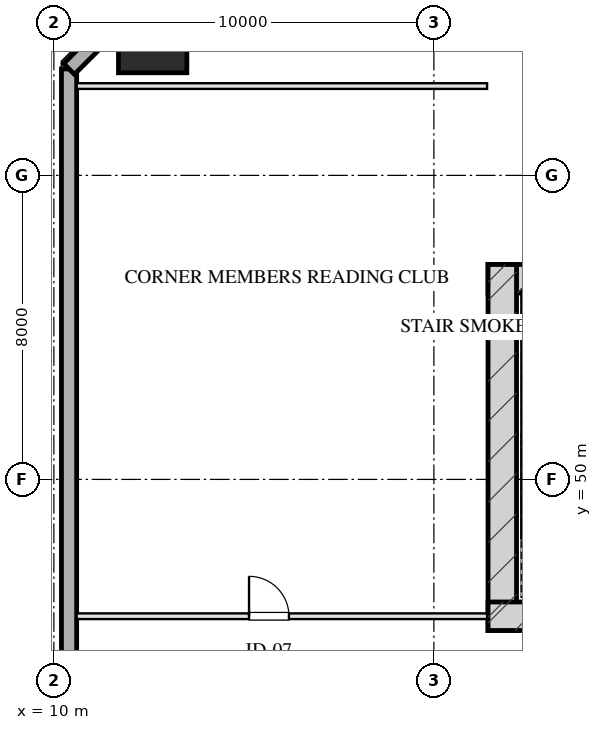
"""IFC4 building model, lengths in metres.
Left out: names, types, materials, properties, quantities, classifications, styles, units other than length and angle.
Written with IfcOpenShell. Run it as: python <this file> out.ifc"""

import sys

from ifc_helpers import new_model, si_unit, direction, frame, frame_2d, origin, origin_2d, place, context, subcontext, project, spatial, rectangle, hollow_rectangle, extrude, element, fill, save


model = new_model("IFC4")
c1 = context("Model", 3, precision=1e-05, world=origin(), true_north=direction((0.0, 1.0)))
c2 = subcontext(c1, "Body", "Model", "MODEL_VIEW")
j1 = project(units=[si_unit("LENGTHUNIT", "METRE"), si_unit("PLANEANGLEUNIT", "RADIAN")], contexts=[c1])
p1 = place(None, origin())
s1 = spatial("IfcSite", under=j1, at=p1, CompositionType="ELEMENT")
p2 = place(p1, origin())
s2 = spatial("IfcBuilding", under=s1, at=p2, CompositionType="ELEMENT")
p3 = place(p2, frame((0.0, 0.0, 54.05)))
s3 = spatial("IfcBuildingStorey", under=s2, at=p3, CompositionType="ELEMENT", Elevation=54.05)
p4 = place(p3, frame((21.425, 55.28, 0.0), z_axis=(0.0, 0.0, 1.0), x_axis=(1.0, 0.0, 0.0)))
e1 = element("IfcWall", 1, at=p4, inside=s3, PredefinedType="SHEAR", context=c2, shape_type="SweptSolid", body=[
    extrude(rectangle(XDim=17.15, YDim=0.75, at=frame_2d((8.575, 0.0))), origin(), (0.0, 0.0, 1.0), 3.45),
])
p5 = place(p3, frame((21.8, 46.025, 0.0), z_axis=(0.0, 0.0, 1.0), x_axis=(0.0, 1.0, 0.0)))
e2 = element("IfcWall", 2, at=p5, inside=s3, PredefinedType="SHEAR", context=c2, shape_type="SweptSolid", body=[
    extrude(rectangle(XDim=9.63, YDim=0.75, at=frame_2d((4.815, 0.0))), origin(), (0.0, 0.0, 1.0), 3.45),
])
p6 = place(p3, frame((21.425, 46.4, 0.0), z_axis=(0.0, 0.0, 1.0), x_axis=(1.0, 0.0, 0.0)))
e3 = element("IfcWall", 3, at=p6, inside=s3, PredefinedType="SHEAR", context=c2, shape_type="SweptSolid", body=[
    extrude(rectangle(XDim=4.295, YDim=0.75, at=frame_2d((2.147, 0.0))), origin(), (0.0, 0.0, 1.0), 3.45),
])
p7 = place(p3, frame((12.6, 61.6, 0.0), z_axis=(0.0, 0.0, 1.0), x_axis=(1.0, 0.0, 0.0)))
e4 = element("IfcColumn", 4, at=p7, inside=s3, PredefinedType="COLUMN", context=c2, shape_type="SweptSolid", body=[
    extrude(hollow_rectangle(XDim=1.8, YDim=1.8, WallThickness=0.06, at=origin_2d()), origin(), (0.0, 0.0, 1.0), 3.451),
])
p8 = place(p3, frame((10.4, 7.2, 0.0), z_axis=(0.0, 0.0, 1.0), x_axis=(0.0, 1.0, 0.0)))
e5 = element("IfcWall", 5, at=p8, inside=s3, PredefinedType="SOLIDWALL", context=c2, shape_type="SweptSolid", body=[
    extrude(rectangle(XDim=53.6, YDim=0.4, at=frame_2d((26.8, 0.0))), origin(), (0.0, 0.0, 1.0), 2.61),
])
p9 = place(p8, frame((19.15, 0.0, 0.75)))
e6 = element("IfcOpeningElement", 6, at=p9, cuts=e5, PredefinedType="OPENING", context=c2, shape_type="SweptSolid", body=[
    extrude(rectangle(XDim=2.5, YDim=1.46, at=frame_2d((1.25, 0.73))), frame((0.0, 0.21, 0.0), z_axis=(0.0, -1.0, 0.0), x_axis=(1.0, 0.0, 0.0)), (0.0, 0.0, 1.0), 0.42),
])
p10 = place(p8, frame((22.95, 0.0, 0.75)))
e7 = element("IfcOpeningElement", 7, at=p10, cuts=e5, PredefinedType="OPENING", context=c2, shape_type="SweptSolid", body=[
    extrude(rectangle(XDim=2.5, YDim=1.46, at=frame_2d((1.25, 0.73))), frame((0.0, 0.21, 0.0), z_axis=(0.0, -1.0, 0.0), x_axis=(1.0, 0.0, 0.0)), (0.0, 0.0, 1.0), 0.42),
])
p11 = place(p8, frame((31.95, 0.0, 0.75)))
e8 = element("IfcOpeningElement", 8, at=p11, cuts=e5, PredefinedType="OPENING", context=c2, shape_type="SweptSolid", body=[
    extrude(rectangle(XDim=2.5, YDim=1.46, at=frame_2d((1.25, 0.73))), frame((0.0, 0.21, 0.0), z_axis=(0.0, -1.0, 0.0), x_axis=(1.0, 0.0, 0.0)), (0.0, 0.0, 1.0), 0.42),
])
p12 = place(p3, frame((10.4, 60.8, 0.0), z_axis=(0.0, 0.0, 1.0), x_axis=(0.707106781187, 0.707106781187, 0.0)))
e9 = element("IfcWall", 9, at=p12, inside=s3, PredefinedType="SOLIDWALL", context=c2, shape_type="SweptSolid", body=[
    extrude(rectangle(XDim=4.243, YDim=0.4, at=frame_2d((2.121, 0.0))), origin(), (0.0, 0.0, 1.0), 2.61),
])
p13 = place(p3, frame((10.6, 60.35, 0.0), z_axis=(0.0, 0.0, 1.0), x_axis=(1.0, 0.0, 0.0)))
e10 = element("IfcWall", 10, at=p13, inside=s3, PredefinedType="PARTITIONING", context=c2, shape_type="SweptSolid", body=[
    extrude(rectangle(XDim=10.8, YDim=0.15, at=frame_2d((5.4, 0.0))), origin(), (0.0, 0.0, 1.0), 3.175),
])
p14 = place(p3, frame((10.6, 46.4, 0.0), z_axis=(0.0, 0.0, 1.0), x_axis=(1.0, 0.0, 0.0)))
e11 = element("IfcWall", 11, at=p14, inside=s3, PredefinedType="PARTITIONING", context=c2, shape_type="SweptSolid", body=[
    extrude(rectangle(XDim=10.8, YDim=0.15, at=frame_2d((5.4, 0.0))), origin(), (0.0, 0.0, 1.0), 3.175),
])
p15 = place(p14, frame((4.536, 0.0, 0.0)))
e12 = element("IfcOpeningElement", 12, at=p15, cuts=e11, PredefinedType="OPENING", context=c2, shape_type="SweptSolid", body=[
    extrude(rectangle(XDim=1.05, YDim=2.05, at=frame_2d((0.525, 1.025))), frame((0.0, 0.085, 0.0), z_axis=(0.0, -1.0, 0.0), x_axis=(1.0, 0.0, 0.0)), (0.0, 0.0, 1.0), 0.17),
])
p16 = place(p15, origin())
e13 = element("IfcDoor", 13, at=p16, inside=s3, OperationType="SINGLE_SWING_LEFT", PredefinedType="DOOR", context=c2, shape_type="SweptSolid", body=[
    extrude(rectangle(XDim=1.05, YDim=2.05, at=frame_2d((0.525, 1.025))), frame((0.0, 0.025, 0.0), z_axis=(0.0, -1.0, 0.0), x_axis=(1.0, 0.0, 0.0)), (0.0, 0.0, 1.0), 0.05),
])
fill(e12, e13)
save(model, sys.argv[1])
